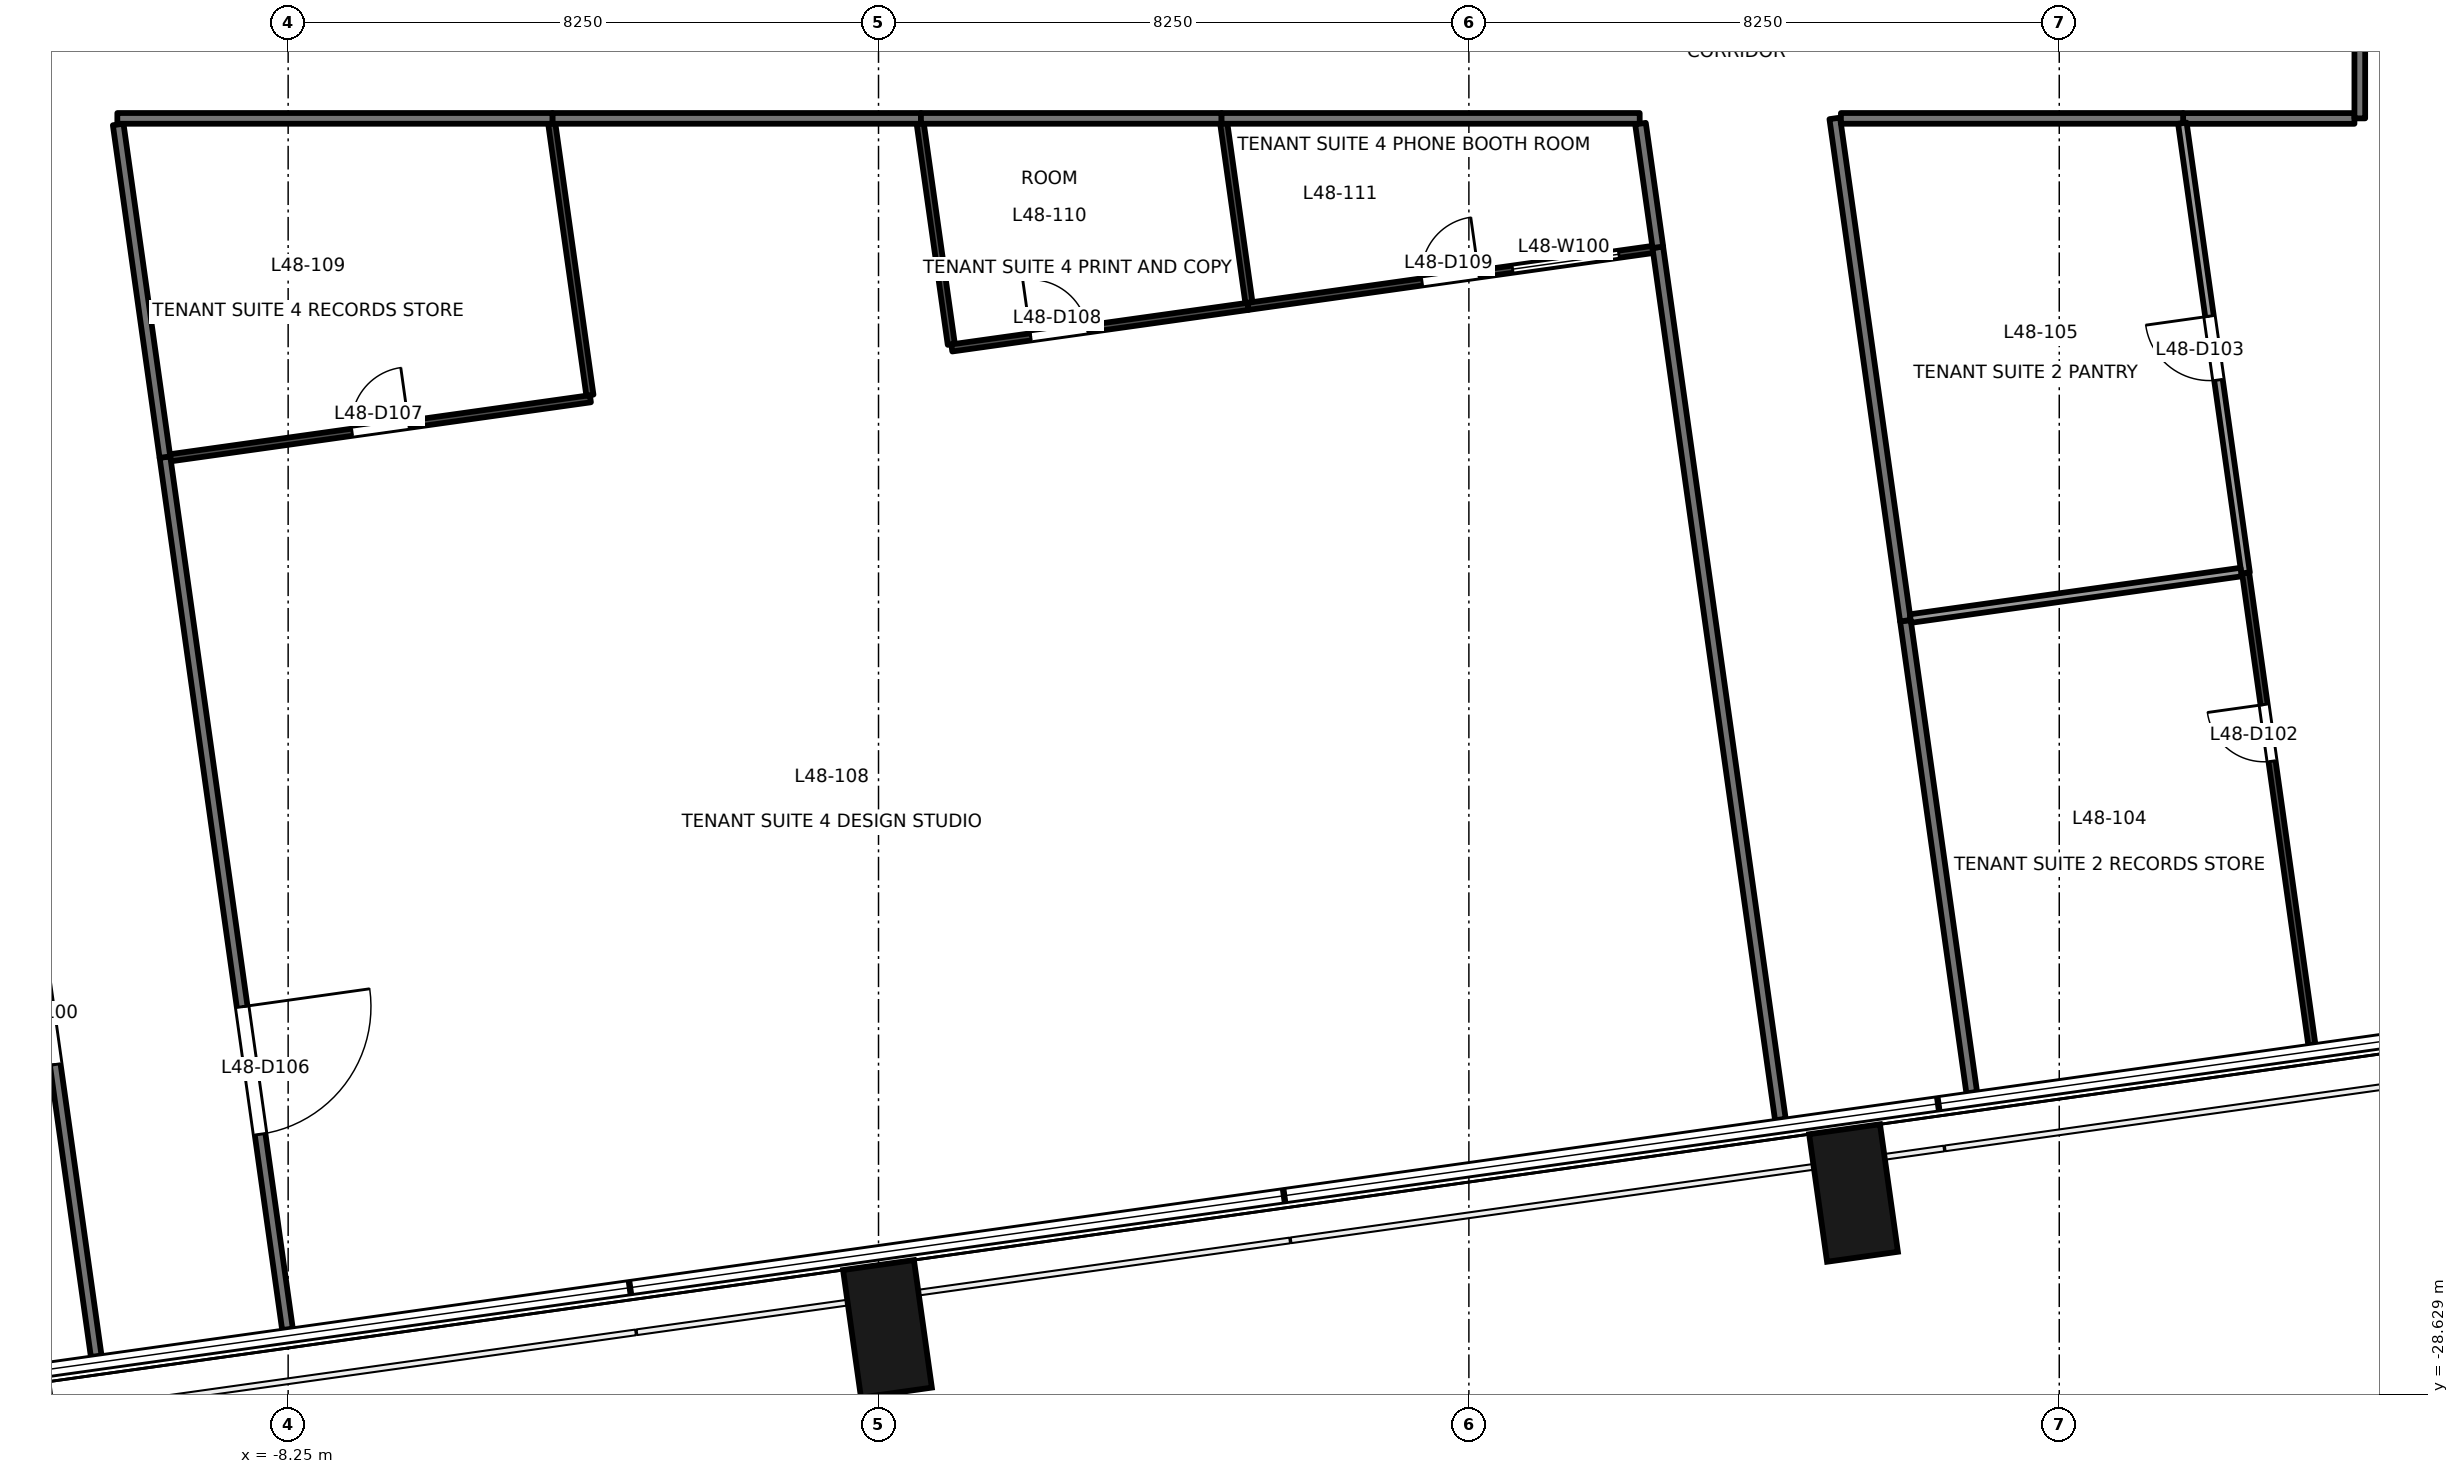
"""IFC4 building model, lengths in metres.
Left out: names, types, materials, properties, quantities, classifications, styles, units other than length and angle.
Written with IfcOpenShell. Run it as: python <this file> out.ifc"""

import sys

from ifc_helpers import new_model, si_unit, direction, frame, frame_2d, origin, origin_2d, place, context, subcontext, project, spatial, rectangle, extrude, element, fill, save


model = new_model("IFC4")
c1 = context("Model", 3, precision=1e-05, world=origin(), true_north=direction((0.0, 1.0)))
c2 = subcontext(c1, "Body", "Model", "MODEL_VIEW")
j1 = project(units=[si_unit("LENGTHUNIT", "METRE"), si_unit("PLANEANGLEUNIT", "RADIAN")], contexts=[c1])
p1 = place(None, origin())
s1 = spatial("IfcSite", under=j1, at=p1, CompositionType="ELEMENT")
p2 = place(p1, origin())
s2 = spatial("IfcBuilding", under=s1, at=p2, CompositionType="ELEMENT")
p3 = place(p2, frame((0.0, 0.0, 213.5)))
s3 = spatial("IfcBuildingStorey", under=s2, at=p3, CompositionType="ELEMENT", Elevation=213.5)
for number, where, z_axis, x_axis in (
    (1, (-11.971, -29.416, -0.2), (0.0, 0.0, 1.0), (0.99, 0.139, 0.0)),
    (2, (0.125, -27.716, -0.2), (0.0, 0.0, 1.0), (0.99, 0.139, 0.0)),
    (3, (13.625, -25.818, -0.2), (0.0, 0.0, 1.0), (0.99, 0.139, 0.0)),
):
    element("IfcColumn", number, at=place(p3, frame(where, z_axis=z_axis, x_axis=x_axis)), inside=s3, PredefinedType="COLUMN", context=c2, shape_type="SweptSolid", body=[
        extrude(rectangle(XDim=1.0, YDim=1.8, at=origin_2d()), origin(), (0.0, 0.0, 1.0), 3.9),
    ])
p4 = place(p3, frame((-10.932, -28.099, 0.0), z_axis=(0.0, 0.0, 1.0), x_axis=(-0.139168963114, 0.990268650269, 0.0)))
e4 = element("IfcWall", 4, at=p4, inside=s3, PredefinedType="PARTITIONING", context=c2, shape_type="SweptSolid", body=[
    extrude(rectangle(XDim=17.469, YDim=0.15, at=frame_2d((8.734, 0.0))), origin(), (0.0, 0.0, 1.0), 3.7),
])
p5 = place(p4, frame((4.117, 0.0, 0.0)))
e5 = element("IfcOpeningElement", 5, at=p5, cuts=e4, PredefinedType="OPENING", context=c2, shape_type="SweptSolid", body=[
    extrude(rectangle(XDim=1.5, YDim=2.1, at=frame_2d((0.75, 1.05))), frame((0.0, 0.085, 0.0), z_axis=(0.0, -1.0, 0.0), x_axis=(1.0, 0.0, 0.0)), (0.0, 0.0, 1.0), 0.171),
])
p6 = place(p3, frame((20.625, -10.801, 0.0), z_axis=(0.0, 0.0, 1.0), x_axis=(-1.0, 0.0, 0.0)))
e6 = element("IfcWall", 6, at=p6, inside=s3, PredefinedType="PARTITIONING", context=c2, shape_type="SweptSolid", body=[
    extrude(rectangle(XDim=2.394, YDim=0.15, at=frame_2d((1.197, 0.0))), origin(), (0.0, 0.0, 1.0), 3.7),
])
p7 = place(p3, frame((20.7, 3.261, 0.0), z_axis=(0.0, 0.0, 1.0), x_axis=(0.0, -1.0, 0.0)))
e7 = element("IfcWall", 7, at=p7, inside=s3, PredefinedType="PARTITIONING", context=c2, shape_type="SweptSolid", body=[
    extrude(rectangle(XDim=14.061, YDim=0.15, at=frame_2d((7.031, 0.0))), origin(), (0.0, 0.0, 1.0), 3.1),
])
p8 = place(p7, frame((3.19, 0.0, 0.0)))
e8 = element("IfcOpeningElement", 8, at=p8, cuts=e7, PredefinedType="OPENING", context=c2, shape_type="SweptSolid", body=[
    extrude(rectangle(XDim=1.8, YDim=2.1, at=frame_2d((0.9, 1.05))), frame((0.0, 0.085, 0.0), z_axis=(0.0, -1.0, 0.0), x_axis=(1.0, 0.0, 0.0)), (0.0, 0.0, 1.0), 0.171),
])
p9 = place(p3, frame((14.35, -17.82, 0.0), z_axis=(0.0, 0.0, 1.0), x_axis=(0.139193607275, -0.99026518655, 0.0)))
e9 = element("IfcWall", 9, at=p9, inside=s3, PredefinedType="PARTITIONING", context=c2, shape_type="SweptSolid", body=[
    extrude(rectangle(XDim=6.66, YDim=0.15, at=frame_2d((3.33, 0.0))), origin(), (0.0, 0.0, 1.0), 3.7),
])
p10 = place(p3, frame((13.363, -10.8, 0.0), z_axis=(0.0, 0.0, 1.0), x_axis=(0.139236890445, -0.990259101619, 0.0)))
e10 = element("IfcWall", 10, at=p10, inside=s3, PredefinedType="PARTITIONING", context=c2, shape_type="SweptSolid", body=[
    extrude(rectangle(XDim=7.089, YDim=0.15, at=frame_2d((3.544, 0.0))), origin(), (0.0, 0.0, 1.0), 2.9),
])
p11 = place(p3, frame((18.231, -10.8, 0.0), z_axis=(0.0, 0.0, 1.0), x_axis=(-1.0, 0.0, 0.0)))
e11 = element("IfcWall", 11, at=p11, inside=s3, PredefinedType="PARTITIONING", context=c2, shape_type="SweptSolid", body=[
    extrude(rectangle(XDim=4.782, YDim=0.15, at=frame_2d((2.391, 0.0))), origin(), (0.0, 0.0, 1.0), 2.9),
])
p12 = place(p3, frame((-9.972, -15.533, 0.0), z_axis=(0.0, 0.0, 1.0), x_axis=(0.139149686673, -0.990271359123, 0.0)))
e12 = element("IfcWall", 12, at=p12, inside=s3, PredefinedType="PARTITIONING", context=c2, shape_type="SweptSolid", body=[
    extrude(rectangle(XDim=12.31, YDim=0.15, at=frame_2d((6.155, 0.0))), origin(), (0.0, 0.0, 1.0), 2.8),
])
p13 = place(p12, frame((7.757, 0.0, 0.0)))
e13 = element("IfcOpeningElement", 13, at=p13, cuts=e12, PredefinedType="OPENING", context=c2, shape_type="SweptSolid", body=[
    extrude(rectangle(XDim=1.8, YDim=2.1, at=frame_2d((0.9, 1.05))), frame((0.0, 0.085, 0.0), z_axis=(0.0, -1.0, 0.0), x_axis=(1.0, 0.0, 0.0)), (0.0, 0.0, 1.0), 0.171),
])
p14 = place(p3, frame((0.593, -10.8, 0.0), z_axis=(0.0, 0.0, 1.0), x_axis=(-1.0, 0.0, 0.0)))
e14 = element("IfcWall", 14, at=p14, inside=s3, PredefinedType="PARTITIONING", context=c2, shape_type="SweptSolid", body=[
    extrude(rectangle(XDim=5.15, YDim=0.15, at=frame_2d((2.575, 0.0))), origin(), (0.0, 0.0, 1.0), 2.8),
])
p15 = place(p3, frame((12.603, -24.791, 0.0), z_axis=(0.0, 0.0, 1.0), x_axis=(-0.139180069817, 0.990267089308, 0.0)))
e15 = element("IfcWall", 15, at=p15, inside=s3, PredefinedType="PARTITIONING", context=c2, shape_type="SweptSolid", body=[
    extrude(rectangle(XDim=12.309, YDim=0.15, at=frame_2d((6.154, 0.0))), origin(), (0.0, 0.0, 1.0), 3.7),
])
p16 = place(p3, frame((-10.625, -10.885, 0.0), z_axis=(0.0, 0.0, 1.0), x_axis=(0.139112996275, -0.990276514044, 0.0)))
e16 = element("IfcWall", 16, at=p16, inside=s3, PredefinedType="PARTITIONING", context=c2, shape_type="SweptSolid", body=[
    extrude(rectangle(XDim=4.695, YDim=0.15, at=frame_2d((2.347, 0.0))), origin(), (0.0, 0.0, 1.0), 3.7),
])
p17 = place(p3, frame((-4.557, -10.8, 0.0), z_axis=(0.0, 0.0, 1.0), x_axis=(-1.0, 0.0, 0.0)))
e17 = element("IfcWall", 17, at=p17, inside=s3, PredefinedType="PARTITIONING", context=c2, shape_type="SweptSolid", body=[
    extrude(rectangle(XDim=6.08, YDim=0.15, at=frame_2d((3.04, 0.0))), origin(), (0.0, 0.0, 1.0), 2.8),
])
p18 = place(p3, frame((4.794, -10.8, 0.0), z_axis=(0.0, 0.0, 1.0), x_axis=(-1.0, 0.0, 0.0)))
e18 = element("IfcWall", 18, at=p18, inside=s3, PredefinedType="PARTITIONING", context=c2, shape_type="SweptSolid", body=[
    extrude(rectangle(XDim=4.201, YDim=0.15, at=frame_2d((2.101, 0.0))), origin(), (0.0, 0.0, 1.0), 2.8),
])
p19 = place(p3, frame((10.637, -10.8, 0.0), z_axis=(0.0, 0.0, 1.0), x_axis=(-1.0, 0.0, 0.0)))
e19 = element("IfcWall", 19, at=p19, inside=s3, PredefinedType="PARTITIONING", context=c2, shape_type="SweptSolid", body=[
    extrude(rectangle(XDim=5.843, YDim=0.15, at=frame_2d((2.921, 0.0))), origin(), (0.0, 0.0, 1.0), 2.8),
])
p20 = place(p3, frame((10.891, -12.601, 0.0), z_axis=(0.0, 0.0, 1.0), x_axis=(-0.139344862723, 0.990243914009, 0.0)))
e20 = element("IfcWall", 20, at=p20, inside=s3, PredefinedType="PARTITIONING", context=c2, shape_type="SweptSolid", body=[
    extrude(rectangle(XDim=1.745, YDim=0.15, at=frame_2d((0.873, 0.0))), origin(), (0.0, 0.0, 1.0), 3.7),
])
p21 = place(p3, frame((20.03, -23.746, 0.0), z_axis=(0.0, 0.0, 1.0), x_axis=(-0.139070003418, 0.990282552683, 0.0)))
e21 = element("IfcWall", 21, at=p21, inside=s3, PredefinedType="PARTITIONING", context=c2, shape_type="SweptSolid", body=[
    extrude(rectangle(XDim=6.659, YDim=0.1, at=frame_2d((3.329, 0.0))), origin(), (0.0, 0.0, 1.0), 3.7),
])
p22 = place(p21, frame((4.001, 0.0, 0.0)))
e22 = element("IfcOpeningElement", 22, at=p22, cuts=e21, PredefinedType="OPENING", context=c2, shape_type="SweptSolid", body=[
    extrude(rectangle(XDim=0.8, YDim=2.1, at=frame_2d((0.4, 1.05))), frame((0.0, 0.061, 0.0), z_axis=(0.0, -1.0, 0.0), x_axis=(1.0, 0.0, 0.0)), (0.0, 0.0, 1.0), 0.121),
])
p23 = place(p3, frame((19.104, -17.152, 0.0), z_axis=(0.0, 0.0, 1.0), x_axis=(-0.139283120935, 0.99025260021, 0.0)))
e23 = element("IfcWall", 23, at=p23, inside=s3, PredefinedType="PARTITIONING", context=c2, shape_type="SweptSolid", body=[
    extrude(rectangle(XDim=6.347, YDim=0.12, at=frame_2d((3.173, 0.0))), origin(), (0.0, 0.0, 1.0), 3.7),
])
p24 = place(p23, frame((2.723, 0.0, 0.0)))
e24 = element("IfcOpeningElement", 24, at=p24, cuts=e23, PredefinedType="OPENING", context=c2, shape_type="SweptSolid", body=[
    extrude(rectangle(XDim=0.9, YDim=2.1, at=frame_2d((0.45, 1.05))), frame((0.0, 0.071, 0.0), z_axis=(0.0, -1.0, 0.0), x_axis=(1.0, 0.0, 0.0)), (0.0, 0.0, 1.0), 0.141),
])
p25 = place(p3, frame((14.421, -17.79, 0.0), z_axis=(0.0, 0.0, 1.0), x_axis=(0.990243495755, 0.139347834982, 0.0)))
e25 = element("IfcWall", 25, at=p25, inside=s3, PredefinedType="PARTITIONING", context=c2, shape_type="SweptSolid", body=[
    extrude(rectangle(XDim=4.666, YDim=0.12, at=frame_2d((2.333, 0.0))), origin(), (0.0, 0.0, 1.0), 3.7),
])
p26 = place(p3, frame((-9.895, -15.543, 0.0), z_axis=(0.0, 0.0, 1.0), x_axis=(0.990265807236, 0.139189191458, 0.0)))
e26 = element("IfcWall", 26, at=p26, inside=s3, PredefinedType="PARTITIONING", context=c2, shape_type="SweptSolid", body=[
    extrude(rectangle(XDim=5.927, YDim=0.1, at=frame_2d((2.963, 0.0))), origin(), (0.0, 0.0, 1.0), 2.8),
])
p27 = place(p26, frame((2.563, 0.0, 0.0)))
e27 = element("IfcOpeningElement", 27, at=p27, cuts=e26, PredefinedType="OPENING", context=c2, shape_type="SweptSolid", body=[
    extrude(rectangle(XDim=0.8, YDim=2.1, at=frame_2d((0.4, 1.05))), frame((0.0, 0.061, 0.0), z_axis=(0.0, -1.0, 0.0), x_axis=(1.0, 0.0, 0.0)), (0.0, 0.0, 1.0), 0.121),
])
p28 = place(p3, frame((-4.033, -14.668, 0.0), z_axis=(0.0, 0.0, 1.0), x_axis=(-0.139140777399, 0.990272610984, 0.0)))
e28 = element("IfcWall", 28, at=p28, inside=s3, PredefinedType="PARTITIONING", context=c2, shape_type="SweptSolid", body=[
    extrude(rectangle(XDim=3.837, YDim=0.1, at=frame_2d((1.919, 0.0))), origin(), (0.0, 0.0, 1.0), 2.8),
])
p29 = place(p3, frame((0.582, -10.868, 0.0), z_axis=(0.0, 0.0, 1.0), x_axis=(0.139416658497, -0.990233808418, 0.0)))
e29 = element("IfcWall", 29, at=p29, inside=s3, PredefinedType="PARTITIONING", context=c2, shape_type="SweptSolid", body=[
    extrude(rectangle(XDim=3.121, YDim=0.1, at=frame_2d((1.56, 0.0))), origin(), (0.0, 0.0, 1.0), 3.7),
])
p30 = place(p3, frame((1.024, -14.008, 0.0), z_axis=(0.0, 0.0, 1.0), x_axis=(0.990290027482, 0.139016766864, 0.0)))
e30 = element("IfcWall", 30, at=p30, inside=s3, PredefinedType="PARTITIONING", context=c2, shape_type="SweptSolid", body=[
    extrude(rectangle(XDim=4.18, YDim=0.1, at=frame_2d((2.09, 0.0))), origin(), (0.0, 0.0, 1.0), 2.8),
])
p31 = place(p30, frame((1.114, 0.0, 0.0)))
e31 = element("IfcOpeningElement", 31, at=p31, cuts=e30, PredefinedType="OPENING", context=c2, shape_type="SweptSolid", body=[
    extrude(rectangle(XDim=0.8, YDim=2.1, at=frame_2d((0.4, 1.05))), frame((0.0, 0.061, 0.0), z_axis=(0.0, -1.0, 0.0), x_axis=(1.0, 0.0, 0.0)), (0.0, 0.0, 1.0), 0.121),
])
p32 = place(p3, frame((5.163, -13.427, 0.0), z_axis=(0.0, 0.0, 1.0), x_axis=(0.9902675357, 0.139176893695, 0.0)))
e32 = element("IfcWall", 32, at=p32, inside=s3, PredefinedType="PARTITIONING", context=c2, shape_type="SweptSolid", body=[
    extrude(rectangle(XDim=5.712, YDim=0.1, at=frame_2d((2.856, 0.0))), origin(), (0.0, 0.0, 1.0), 2.8),
])
p33 = place(p32, frame((2.456, 0.0, 0.0)))
e33 = element("IfcOpeningElement", 33, at=p33, cuts=e32, PredefinedType="OPENING", context=c2, shape_type="SweptSolid", body=[
    extrude(rectangle(XDim=0.8, YDim=2.1, at=frame_2d((0.4, 1.05))), frame((0.0, 0.061, 0.0), z_axis=(0.0, -1.0, 0.0), x_axis=(1.0, 0.0, 0.0)), (0.0, 0.0, 1.0), 0.121),
])
p34 = place(p32, frame((3.734, 0.0, 0.9)))
e34 = element("IfcOpeningElement", 34, at=p34, cuts=e32, PredefinedType="OPENING", context=c2, shape_type="SweptSolid", body=[
    extrude(rectangle(XDim=1.5, YDim=1.2, at=frame_2d((0.75, 0.6))), frame((0.0, 0.061, 0.0), z_axis=(0.0, -1.0, 0.0), x_axis=(1.0, 0.0, 0.0)), (0.0, 0.0, 1.0), 0.121),
])
p35 = place(p3, frame((4.824, -10.868, 0.0), z_axis=(0.0, 0.0, 1.0), x_axis=(0.139111451168, -0.990276731098, 0.0)))
e35 = element("IfcWall", 35, at=p35, inside=s3, PredefinedType="PARTITIONING", context=c2, shape_type="SweptSolid", body=[
    extrude(rectangle(XDim=2.531, YDim=0.1, at=frame_2d((1.265, 0.0))), origin(), (0.0, 0.0, 1.0), 3.7),
])
p36 = place(p5, origin())
e36 = element("IfcDoor", 36, at=p36, inside=s3, OperationType="DOUBLE_DOOR_SINGLE_SWING", PredefinedType="DOOR", context=c2, shape_type="SweptSolid", body=[
    extrude(rectangle(XDim=1.5, YDim=2.1, at=frame_2d((0.75, 1.05))), frame((0.0, 0.025, 0.0), z_axis=(0.0, -1.0, 0.0), x_axis=(1.0, 0.0, 0.0)), (0.0, 0.0, 1.0), 0.05),
])
fill(e5, e36)
p37 = place(p22, origin())
e37 = element("IfcDoor", 37, at=p37, inside=s3, OperationType="SINGLE_SWING_RIGHT", PredefinedType="DOOR", context=c2, shape_type="SweptSolid", body=[
    extrude(rectangle(XDim=0.8, YDim=2.1, at=frame_2d((0.4, 1.05))), frame((0.0, 0.025, 0.0), z_axis=(0.0, -1.0, 0.0), x_axis=(1.0, 0.0, 0.0)), (0.0, 0.0, 1.0), 0.05),
])
fill(e22, e37)
p38 = place(p24, origin())
e38 = element("IfcDoor", 38, at=p38, inside=s3, OperationType="SINGLE_SWING_RIGHT", PredefinedType="DOOR", context=c2, shape_type="SweptSolid", body=[
    extrude(rectangle(XDim=0.9, YDim=2.1, at=frame_2d((0.45, 1.05))), frame((0.0, 0.025, 0.0), z_axis=(0.0, -1.0, 0.0), x_axis=(1.0, 0.0, 0.0)), (0.0, 0.0, 1.0), 0.05),
])
fill(e24, e38)
p39 = place(p13, origin())
e39 = element("IfcDoor", 39, at=p39, inside=s3, OperationType="DOUBLE_DOOR_SINGLE_SWING", PredefinedType="DOOR", context=c2, shape_type="SweptSolid", body=[
    extrude(rectangle(XDim=1.8, YDim=2.1, at=frame_2d((0.9, 1.05))), frame((0.0, 0.025, 0.0), z_axis=(0.0, -1.0, 0.0), x_axis=(1.0, 0.0, 0.0)), (0.0, 0.0, 1.0), 0.05),
])
fill(e13, e39)
p40 = place(p27, origin())
e40 = element("IfcDoor", 40, at=p40, inside=s3, OperationType="SINGLE_SWING_RIGHT", PredefinedType="DOOR", context=c2, shape_type="SweptSolid", body=[
    extrude(rectangle(XDim=0.8, YDim=2.1, at=frame_2d((0.4, 1.05))), frame((0.0, 0.025, 0.0), z_axis=(0.0, -1.0, 0.0), x_axis=(1.0, 0.0, 0.0)), (0.0, 0.0, 1.0), 0.05),
])
fill(e27, e40)
p41 = place(p31, origin())
e41 = element("IfcDoor", 41, at=p41, inside=s3, OperationType="SINGLE_SWING_LEFT", PredefinedType="DOOR", context=c2, shape_type="SweptSolid", body=[
    extrude(rectangle(XDim=0.8, YDim=2.1, at=frame_2d((0.4, 1.05))), frame((0.0, 0.025, 0.0), z_axis=(0.0, -1.0, 0.0), x_axis=(1.0, 0.0, 0.0)), (0.0, 0.0, 1.0), 0.05),
])
fill(e31, e41)
p42 = place(p33, origin())
e42 = element("IfcDoor", 42, at=p42, inside=s3, OperationType="SINGLE_SWING_RIGHT", PredefinedType="DOOR", context=c2, shape_type="SweptSolid", body=[
    extrude(rectangle(XDim=0.8, YDim=2.1, at=frame_2d((0.4, 1.05))), frame((0.0, 0.025, 0.0), z_axis=(0.0, -1.0, 0.0), x_axis=(1.0, 0.0, 0.0)), (0.0, 0.0, 1.0), 0.05),
])
fill(e33, e42)
p43 = place(p34, origin())
e43 = element("IfcWindow", 43, at=p43, inside=s3, PartitioningType="SINGLE_PANEL", PredefinedType="WINDOW", context=c2, shape_type="SweptSolid", body=[
    extrude(rectangle(XDim=1.5, YDim=1.2, at=frame_2d((0.75, 0.6))), frame((0.0, 0.03, 0.0), z_axis=(0.0, -1.0, 0.0), x_axis=(1.0, 0.0, 0.0)), (0.0, 0.0, 1.0), 0.06),
])
fill(e34, e43)
save(model, sys.argv[1])
